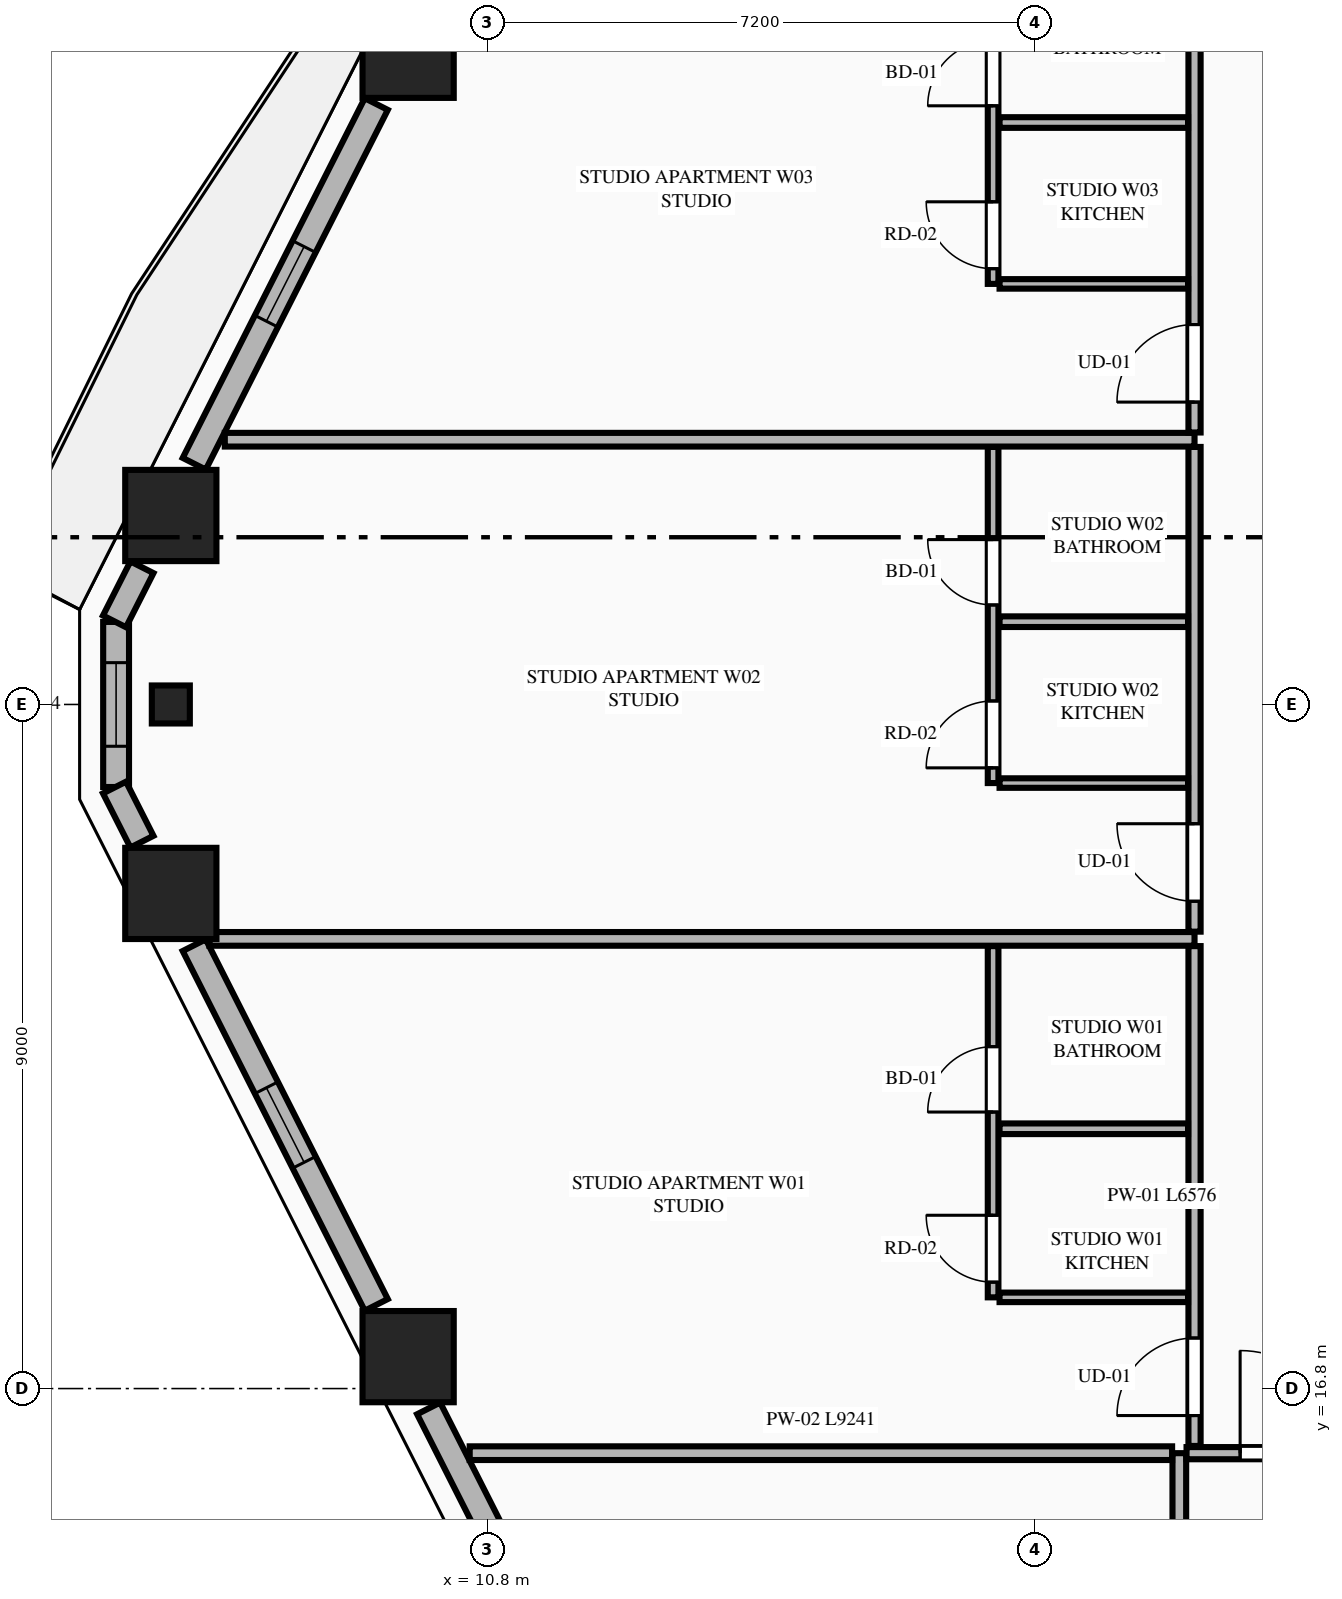
"""IFC4 building model, lengths in metres.
Left out: names, types, materials, properties, quantities, classifications, styles, units other than length and angle.
Written with IfcOpenShell. Run it as: python <this file> out.ifc"""

import sys

from ifc_helpers import new_model, si_unit, direction, frame, frame_2d, origin, origin_2d, place, context, subcontext, project, spatial, rectangle, extrude, element, fill, save


model = new_model("IFC4")
c1 = context("Model", 3, precision=1e-05, world=origin(), true_north=direction((0.0, 1.0)))
c2 = subcontext(c1, "Body", "Model", "MODEL_VIEW")
j1 = project(units=[si_unit("LENGTHUNIT", "METRE"), si_unit("PLANEANGLEUNIT", "RADIAN")], contexts=[c1])
p1 = place(None, origin())
s1 = spatial("IfcSite", under=j1, at=p1, CompositionType="ELEMENT")
p2 = place(p1, origin())
s2 = spatial("IfcBuilding", under=s1, at=p2, CompositionType="ELEMENT")
p3 = place(p2, frame((0.0, 0.0, 71.05)))
s3 = spatial("IfcBuildingStorey", under=s2, at=p3, CompositionType="ELEMENT", Elevation=71.05)
for number, where, z_axis, x_axis in (
    (1, (9.754, 34.38, 0.0), (0.0, 0.0, 1.0), (1.0, 0.0, 0.0)),
    (2, (6.632, 28.286, 0.0), (0.0, 0.0, 1.0), (1.0, 0.0, 0.0)),
    (3, (6.632, 23.314, 0.0), (0.0, 0.0, 1.0), (1.0, 0.0, 0.0)),
    (4, (9.754, 17.22, 0.0), (0.0, 0.0, 1.0), (1.0, 0.0, 0.0)),
):
    element("IfcColumn", number, at=place(p3, frame(where, z_axis=z_axis, x_axis=x_axis)), inside=s3, PredefinedType="COLUMN", context=c2, shape_type="SweptSolid", body=[
        extrude(rectangle(XDim=1.2, YDim=1.2, at=origin_2d()), origin(), (0.0, 0.0, 1.0), 3.55),
    ])
p4 = place(p3, frame((6.632, 25.8, 0.0), z_axis=(0.0, 0.0, 1.0), x_axis=(0.0, -1.0, 0.0)))
e5 = element("IfcColumn", 5, at=p4, inside=s3, PredefinedType="PILASTER", context=c2, shape_type="SweptSolid", body=[
    extrude(rectangle(XDim=0.5, YDim=0.35, at=origin_2d()), origin(), (0.0, 0.0, 1.0), 3.55),
])
p5 = place(p3, frame((5.912, 26.886, 0.0), z_axis=(0.0, 0.0, 1.0), x_axis=(0.0, -1.0, 0.0)))
e6 = element("IfcWall", 6, at=p5, inside=s3, PredefinedType="STANDARD", context=c2, shape_type="SweptSolid", body=[
    extrude(rectangle(XDim=2.172, YDim=0.34, at=frame_2d((1.086, 0.0))), origin(), (0.0, 0.0, 1.0), 3.27),
])
p6 = place(p5, frame((0.536, 0.0, 0.75)))
e7 = element("IfcOpeningElement", 7, at=p6, cuts=e6, PredefinedType="OPENING", context=c2, shape_type="SweptSolid", body=[
    extrude(rectangle(XDim=1.1, YDim=2.0, at=frame_2d((0.55, 1.0))), frame((0.0, 0.18, 0.0), z_axis=(0.0, -1.0, 0.0), x_axis=(1.0, 0.0, 0.0)), (0.0, 0.0, 1.0), 0.36),
])
p7 = place(p3, frame((9.335, 33.699, 0.0), z_axis=(0.0, 0.0, 1.0), x_axis=(-0.451590635984, -0.892225250422, 0.0)))
e8 = element("IfcWall", 8, at=p7, inside=s3, PredefinedType="STANDARD", context=c2, shape_type="SweptSolid", body=[
    extrude(rectangle(XDim=5.303, YDim=0.34, at=frame_2d((2.652, 0.0))), origin(), (0.0, 0.0, 1.0), 2.652),
])
p8 = place(p7, frame((2.102, 0.0, 0.75)))
e9 = element("IfcOpeningElement", 9, at=p8, cuts=e8, PredefinedType="OPENING", context=c2, shape_type="SweptSolid", body=[
    extrude(rectangle(XDim=1.1, YDim=1.752, at=frame_2d((0.55, 0.876))), frame((0.0, 0.18, 0.0), z_axis=(0.0, -1.0, 0.0), x_axis=(1.0, 0.0, 0.0)), (0.0, 0.0, 1.0), 0.36),
])
for number, where, z_axis, x_axis in (
    (10, (6.252, 27.605, 0.0), (0.0, 0.0, 1.0), (-0.452, -0.892, 0.0)),
    (11, (5.891, 24.707, 0.0), (0.0, 0.0, 1.0), (0.452, -0.892, 0.0)),
):
    element("IfcWall", number, at=place(p3, frame(where, z_axis=z_axis, x_axis=x_axis)), inside=s3, PredefinedType="STANDARD", context=c2, shape_type="SweptSolid", body=[
        extrude(rectangle(XDim=0.798, YDim=0.34, at=frame_2d((0.399, 0.0))), origin(), (0.0, 0.0, 1.0), 3.27),
    ])
p9 = place(p3, frame((6.94, 22.633, 0.0), z_axis=(0.0, 0.0, 1.0), x_axis=(0.451572088722, -0.892234637686, 0.0)))
e12 = element("IfcWall", 12, at=p9, inside=s3, PredefinedType="STANDARD", context=c2, shape_type="SweptSolid", body=[
    extrude(rectangle(XDim=5.304, YDim=0.34, at=frame_2d((2.652, 0.0))), origin(), (0.0, 0.0, 1.0), 2.652),
])
p10 = place(p9, frame((2.102, 0.0, 0.75)))
e13 = element("IfcOpeningElement", 13, at=p10, cuts=e12, PredefinedType="OPENING", context=c2, shape_type="SweptSolid", body=[
    extrude(rectangle(XDim=1.1, YDim=1.752, at=frame_2d((0.55, 0.876))), frame((0.0, 0.18, 0.0), z_axis=(0.0, -1.0, 0.0), x_axis=(1.0, 0.0, 0.0)), (0.0, 0.0, 1.0), 0.36),
])
p11 = place(p3, frame((10.024, 16.539, 0.0), z_axis=(0.0, 0.0, 1.0), x_axis=(0.451627137896, -0.892206774417, 0.0)))
e14 = element("IfcWall", 14, at=p11, inside=s3, PredefinedType="STANDARD", context=c2, shape_type="SweptSolid", body=[
    extrude(rectangle(XDim=5.547, YDim=0.34, at=frame_2d((2.773, 0.0))), origin(), (0.0, 0.0, 1.0), 2.652),
])
p12 = place(p11, frame((2.223, 0.0, 0.75)))
e15 = element("IfcOpeningElement", 15, at=p12, cuts=e14, PredefinedType="OPENING", context=c2, shape_type="SweptSolid", body=[
    extrude(rectangle(XDim=1.1, YDim=1.752, at=frame_2d((0.55, 0.876))), frame((0.0, 0.18, 0.0), z_axis=(0.0, -1.0, 0.0), x_axis=(1.0, 0.0, 0.0)), (0.0, 0.0, 1.0), 0.36),
])
p13 = place(p3, frame((19.9, 2.455, 0.0), z_axis=(0.0, 0.0, 1.0), x_axis=(0.0, 1.0, 0.0)))
e16 = element("IfcWall", 16, at=p13, inside=s3, PredefinedType="PARTITIONING", context=c2, shape_type="SweptSolid", body=[
    extrude(rectangle(XDim=13.495, YDim=0.18, at=frame_2d((6.748, 0.0))), origin(), (0.0, 0.0, 1.0), 3.27),
])
p14 = place(p3, frame((19.995, 15.95, 0.0), z_axis=(0.0, 0.0, 1.0), x_axis=(1.0, 0.0, 0.0)))
e17 = element("IfcWall", 17, at=p14, inside=s3, PredefinedType="PARTITIONING", context=c2, shape_type="SweptSolid", body=[
    extrude(rectangle(XDim=24.81, YDim=0.16, at=frame_2d((12.405, 0.0))), origin(), (0.0, 0.0, 1.0), 3.27),
])
p15 = place(p14, frame((0.705, 0.0, 0.0)))
e18 = element("IfcOpeningElement", 18, at=p15, cuts=e17, PredefinedType="OPENING", context=c2, shape_type="SweptSolid", body=[
    extrude(rectangle(XDim=1.35, YDim=2.35, at=frame_2d((0.675, 1.175))), frame((0.0, 0.09, 0.0), z_axis=(0.0, -1.0, 0.0), x_axis=(1.0, 0.0, 0.0)), (0.0, 0.0, 1.0), 0.18),
])
p16 = place(p3, frame((10.564, 15.95, 0.0), z_axis=(0.0, 0.0, 1.0), x_axis=(1.0, 0.0, 0.0)))
e19 = element("IfcWall", 19, at=p16, inside=s3, PredefinedType="PARTITIONING", context=c2, shape_type="SweptSolid", body=[
    extrude(rectangle(XDim=9.241, YDim=0.18, at=frame_2d((4.621, 0.0))), origin(), (0.0, 0.0, 1.0), 3.27),
])
p17 = place(p3, frame((20.1, 16.045, 0.0), z_axis=(0.0, 0.0, 1.0), x_axis=(0.0, 1.0, 0.0)))
e20 = element("IfcWall", 20, at=p17, inside=s3, PredefinedType="PARTITIONING", context=c2, shape_type="SweptSolid", body=[
    extrude(rectangle(XDim=6.576, YDim=0.16, at=frame_2d((3.288, 0.0))), origin(), (0.0, 0.0, 1.0), 2.64),
])
p18 = place(p17, frame((0.4, 0.0, 0.0)))
e21 = element("IfcOpeningElement", 21, at=p18, cuts=e20, PredefinedType="OPENING", context=c2, shape_type="SweptSolid", body=[
    extrude(rectangle(XDim=1.02, YDim=2.25, at=frame_2d((0.51, 1.125))), frame((0.0, 0.09, 0.0), z_axis=(0.0, -1.0, 0.0), x_axis=(1.0, 0.0, 0.0)), (0.0, 0.0, 1.0), 0.18),
])
p19 = place(p3, frame((17.535, 18.0, 0.0), z_axis=(0.0, 0.0, 1.0), x_axis=(1.0, 0.0, 0.0)))
e22 = element("IfcWall", 22, at=p19, inside=s3, PredefinedType="PARTITIONING", context=c2, shape_type="SweptSolid", body=[
    extrude(rectangle(XDim=2.48, YDim=0.125, at=frame_2d((1.24, 0.0))), origin(), (0.0, 0.0, 1.0), 2.64),
])
p20 = place(p3, frame((17.45, 18.0, 0.0), z_axis=(0.0, 0.0, 1.0), x_axis=(0.0, 1.0, 0.0)))
e23 = element("IfcWall", 23, at=p20, inside=s3, PredefinedType="PLUMBINGWALL", context=c2, shape_type="SweptSolid", body=[
    extrude(rectangle(XDim=4.621, YDim=0.14, at=frame_2d((2.311, 0.0))), origin(), (0.0, 0.0, 1.0), 3.27),
])
p21 = place(p20, frame((2.438, 0.0, 0.0)))
e24 = element("IfcOpeningElement", 24, at=p21, cuts=e23, PredefinedType="OPENING", context=c2, shape_type="SweptSolid", body=[
    extrude(rectangle(XDim=0.86, YDim=2.1, at=frame_2d((0.43, 1.05))), frame((0.0, 0.08, 0.0), z_axis=(0.0, -1.0, 0.0), x_axis=(1.0, 0.0, 0.0)), (0.0, 0.0, 1.0), 0.16),
])
p22 = place(p20, frame((0.2, 0.0, 0.0)))
e25 = element("IfcOpeningElement", 25, at=p22, cuts=e23, PredefinedType="OPENING", context=c2, shape_type="SweptSolid", body=[
    extrude(rectangle(XDim=0.88, YDim=2.15, at=frame_2d((0.44, 1.075))), frame((0.0, 0.08, 0.0), z_axis=(0.0, -1.0, 0.0), x_axis=(1.0, 0.0, 0.0)), (0.0, 0.0, 1.0), 0.16),
])
p23 = place(p3, frame((17.535, 20.218, 0.0), z_axis=(0.0, 0.0, 1.0), x_axis=(1.0, 0.0, 0.0)))
e26 = element("IfcWall", 26, at=p23, inside=s3, PredefinedType="PLUMBINGWALL", context=c2, shape_type="SweptSolid", body=[
    extrude(rectangle(XDim=2.48, YDim=0.14, at=frame_2d((1.24, 0.0))), origin(), (0.0, 0.0, 1.0), 3.27),
])
p24 = place(p3, frame((7.14, 22.716, 0.0), z_axis=(0.0, 0.0, 1.0), x_axis=(1.0, 0.0, 0.0)))
e27 = element("IfcWall", 27, at=p24, inside=s3, PredefinedType="PARTITIONING", context=c2, shape_type="SweptSolid", body=[
    extrude(rectangle(XDim=12.96, YDim=0.18, at=frame_2d((6.48, 0.0))), origin(), (0.0, 0.0, 1.0), 3.27),
])
p25 = place(p3, frame((20.1, 22.811, 0.0), z_axis=(0.0, 0.0, 1.0), x_axis=(0.0, 1.0, 0.0)))
e28 = element("IfcWall", 28, at=p25, inside=s3, PredefinedType="PARTITIONING", context=c2, shape_type="SweptSolid", body=[
    extrude(rectangle(XDim=6.377, YDim=0.16, at=frame_2d((3.188, 0.0))), origin(), (0.0, 0.0, 1.0), 3.27),
])
p26 = place(p25, frame((0.4, 0.0, 0.0)))
e29 = element("IfcOpeningElement", 29, at=p26, cuts=e28, PredefinedType="OPENING", context=c2, shape_type="SweptSolid", body=[
    extrude(rectangle(XDim=1.02, YDim=2.25, at=frame_2d((0.51, 1.125))), frame((0.0, 0.09, 0.0), z_axis=(0.0, -1.0, 0.0), x_axis=(1.0, 0.0, 0.0)), (0.0, 0.0, 1.0), 0.18),
])
p27 = place(p3, frame((17.535, 24.766, 0.0), z_axis=(0.0, 0.0, 1.0), x_axis=(1.0, 0.0, 0.0)))
e30 = element("IfcWall", 30, at=p27, inside=s3, PredefinedType="PARTITIONING", context=c2, shape_type="SweptSolid", body=[
    extrude(rectangle(XDim=2.48, YDim=0.125, at=frame_2d((1.24, 0.0))), origin(), (0.0, 0.0, 1.0), 3.27),
])
p28 = place(p3, frame((17.45, 24.766, 0.0), z_axis=(0.0, 0.0, 1.0), x_axis=(0.0, 1.0, 0.0)))
e31 = element("IfcWall", 31, at=p28, inside=s3, PredefinedType="PLUMBINGWALL", context=c2, shape_type="SweptSolid", body=[
    extrude(rectangle(XDim=4.422, YDim=0.14, at=frame_2d((2.211, 0.0))), origin(), (0.0, 0.0, 1.0), 3.27),
])
p29 = place(p28, frame((2.343, 0.0, 0.0)))
e32 = element("IfcOpeningElement", 32, at=p29, cuts=e31, PredefinedType="OPENING", context=c2, shape_type="SweptSolid", body=[
    extrude(rectangle(XDim=0.86, YDim=2.1, at=frame_2d((0.43, 1.05))), frame((0.0, 0.08, 0.0), z_axis=(0.0, -1.0, 0.0), x_axis=(1.0, 0.0, 0.0)), (0.0, 0.0, 1.0), 0.16),
])
p30 = place(p28, frame((0.2, 0.0, 0.0)))
e33 = element("IfcOpeningElement", 33, at=p30, cuts=e31, PredefinedType="OPENING", context=c2, shape_type="SweptSolid", body=[
    extrude(rectangle(XDim=0.88, YDim=2.15, at=frame_2d((0.44, 1.075))), frame((0.0, 0.08, 0.0), z_axis=(0.0, -1.0, 0.0), x_axis=(1.0, 0.0, 0.0)), (0.0, 0.0, 1.0), 0.16),
])
p31 = place(p3, frame((17.535, 26.889, 0.0), z_axis=(0.0, 0.0, 1.0), x_axis=(1.0, 0.0, 0.0)))
e34 = element("IfcWall", 34, at=p31, inside=s3, PredefinedType="PLUMBINGWALL", context=c2, shape_type="SweptSolid", body=[
    extrude(rectangle(XDim=2.48, YDim=0.14, at=frame_2d((1.24, 0.0))), origin(), (0.0, 0.0, 1.0), 3.27),
])
p32 = place(p3, frame((7.342, 29.283, 0.0), z_axis=(0.0, 0.0, 1.0), x_axis=(1.0, 0.0, 0.0)))
e35 = element("IfcWall", 35, at=p32, inside=s3, PredefinedType="PARTITIONING", context=c2, shape_type="SweptSolid", body=[
    extrude(rectangle(XDim=12.758, YDim=0.18, at=frame_2d((6.379, 0.0))), origin(), (0.0, 0.0, 1.0), 3.27),
])
p33 = place(p3, frame((20.1, 29.378, 0.0), z_axis=(0.0, 0.0, 1.0), x_axis=(0.0, 1.0, 0.0)))
e36 = element("IfcWall", 36, at=p33, inside=s3, PredefinedType="PARTITIONING", context=c2, shape_type="SweptSolid", body=[
    extrude(rectangle(XDim=6.377, YDim=0.16, at=frame_2d((3.188, 0.0))), origin(), (0.0, 0.0, 1.0), 2.64),
])
p34 = place(p33, frame((0.4, 0.0, 0.0)))
e37 = element("IfcOpeningElement", 37, at=p34, cuts=e36, PredefinedType="OPENING", context=c2, shape_type="SweptSolid", body=[
    extrude(rectangle(XDim=1.02, YDim=2.25, at=frame_2d((0.51, 1.125))), frame((0.0, 0.09, 0.0), z_axis=(0.0, -1.0, 0.0), x_axis=(1.0, 0.0, 0.0)), (0.0, 0.0, 1.0), 0.18),
])
p35 = place(p3, frame((17.535, 31.333, 0.0), z_axis=(0.0, 0.0, 1.0), x_axis=(1.0, 0.0, 0.0)))
e38 = element("IfcWall", 38, at=p35, inside=s3, PredefinedType="PARTITIONING", context=c2, shape_type="SweptSolid", body=[
    extrude(rectangle(XDim=2.48, YDim=0.125, at=frame_2d((1.24, 0.0))), origin(), (0.0, 0.0, 1.0), 3.27),
])
p36 = place(p3, frame((17.45, 31.333, 0.0), z_axis=(0.0, 0.0, 1.0), x_axis=(0.0, 1.0, 0.0)))
e39 = element("IfcWall", 39, at=p36, inside=s3, PredefinedType="PLUMBINGWALL", context=c2, shape_type="SweptSolid", body=[
    extrude(rectangle(XDim=4.422, YDim=0.14, at=frame_2d((2.211, 0.0))), origin(), (0.0, 0.0, 1.0), 3.27),
])
p37 = place(p36, frame((2.343, 0.0, 0.0)))
e40 = element("IfcOpeningElement", 40, at=p37, cuts=e39, PredefinedType="OPENING", context=c2, shape_type="SweptSolid", body=[
    extrude(rectangle(XDim=0.86, YDim=2.1, at=frame_2d((0.43, 1.05))), frame((0.0, 0.08, 0.0), z_axis=(0.0, -1.0, 0.0), x_axis=(1.0, 0.0, 0.0)), (0.0, 0.0, 1.0), 0.16),
])
p38 = place(p36, frame((0.2, 0.0, 0.0)))
e41 = element("IfcOpeningElement", 41, at=p38, cuts=e39, PredefinedType="OPENING", context=c2, shape_type="SweptSolid", body=[
    extrude(rectangle(XDim=0.88, YDim=2.15, at=frame_2d((0.44, 1.075))), frame((0.0, 0.08, 0.0), z_axis=(0.0, -1.0, 0.0), x_axis=(1.0, 0.0, 0.0)), (0.0, 0.0, 1.0), 0.16),
])
p39 = place(p3, frame((17.535, 33.456, 0.0), z_axis=(0.0, 0.0, 1.0), x_axis=(1.0, 0.0, 0.0)))
e42 = element("IfcWall", 42, at=p39, inside=s3, PredefinedType="PLUMBINGWALL", context=c2, shape_type="SweptSolid", body=[
    extrude(rectangle(XDim=2.48, YDim=0.14, at=frame_2d((1.24, 0.0))), origin(), (0.0, 0.0, 1.0), 2.64),
])
p40 = place(p8, origin())
e43 = element("IfcWindow", 43, at=p40, inside=s3, PartitioningType="SINGLE_PANEL", PredefinedType="WINDOW", context=c2, shape_type="SweptSolid", body=[
    extrude(rectangle(XDim=1.1, YDim=1.752, at=frame_2d((0.55, 0.876))), frame((0.0, 0.03, 0.0), z_axis=(0.0, -1.0, 0.0), x_axis=(1.0, 0.0, 0.0)), (0.0, 0.0, 1.0), 0.06),
])
fill(e9, e43)
p41 = place(p10, origin())
e44 = element("IfcWindow", 44, at=p41, inside=s3, PartitioningType="SINGLE_PANEL", PredefinedType="WINDOW", context=c2, shape_type="SweptSolid", body=[
    extrude(rectangle(XDim=1.1, YDim=1.752, at=frame_2d((0.55, 0.876))), frame((0.0, 0.03, 0.0), z_axis=(0.0, -1.0, 0.0), x_axis=(1.0, 0.0, 0.0)), (0.0, 0.0, 1.0), 0.06),
])
fill(e13, e44)
p42 = place(p15, origin())
e45 = element("IfcDoor", 45, at=p42, inside=s3, OperationType="SINGLE_SWING_LEFT", PredefinedType="DOOR", context=c2, shape_type="SweptSolid", body=[
    extrude(rectangle(XDim=1.35, YDim=2.35, at=frame_2d((0.675, 1.175))), frame((0.0, 0.025, 0.0), z_axis=(0.0, -1.0, 0.0), x_axis=(1.0, 0.0, 0.0)), (0.0, 0.0, 1.0), 0.05),
])
fill(e18, e45)
p43 = place(p21, origin())
e46 = element("IfcDoor", 46, at=p43, inside=s3, OperationType="SINGLE_SWING_LEFT", PredefinedType="DOOR", context=c2, shape_type="SweptSolid", body=[
    extrude(rectangle(XDim=0.86, YDim=2.1, at=frame_2d((0.43, 1.05))), frame((0.0, 0.025, 0.0), z_axis=(0.0, -1.0, 0.0), x_axis=(1.0, 0.0, 0.0)), (0.0, 0.0, 1.0), 0.05),
])
fill(e24, e46)
p44 = place(p18, origin())
e47 = element("IfcDoor", 47, at=p44, inside=s3, OperationType="SINGLE_SWING_LEFT", PredefinedType="DOOR", context=c2, shape_type="SweptSolid", body=[
    extrude(rectangle(XDim=1.02, YDim=2.25, at=frame_2d((0.51, 1.125))), frame((0.0, 0.025, 0.0), z_axis=(0.0, -1.0, 0.0), x_axis=(1.0, 0.0, 0.0)), (0.0, 0.0, 1.0), 0.05),
])
fill(e21, e47)
p45 = place(p22, origin())
e48 = element("IfcDoor", 48, at=p45, inside=s3, OperationType="SINGLE_SWING_RIGHT", PredefinedType="DOOR", context=c2, shape_type="SweptSolid", body=[
    extrude(rectangle(XDim=0.88, YDim=2.15, at=frame_2d((0.44, 1.075))), frame((0.0, 0.025, 0.0), z_axis=(0.0, -1.0, 0.0), x_axis=(1.0, 0.0, 0.0)), (0.0, 0.0, 1.0), 0.05),
])
fill(e25, e48)
p46 = place(p29, origin())
e49 = element("IfcDoor", 49, at=p46, inside=s3, OperationType="SINGLE_SWING_RIGHT", PredefinedType="DOOR", context=c2, shape_type="SweptSolid", body=[
    extrude(rectangle(XDim=0.86, YDim=2.1, at=frame_2d((0.43, 1.05))), frame((0.0, 0.025, 0.0), z_axis=(0.0, -1.0, 0.0), x_axis=(1.0, 0.0, 0.0)), (0.0, 0.0, 1.0), 0.05),
])
fill(e32, e49)
p47 = place(p26, origin())
e50 = element("IfcDoor", 50, at=p47, inside=s3, OperationType="SINGLE_SWING_RIGHT", PredefinedType="DOOR", context=c2, shape_type="SweptSolid", body=[
    extrude(rectangle(XDim=1.02, YDim=2.25, at=frame_2d((0.51, 1.125))), frame((0.0, 0.025, 0.0), z_axis=(0.0, -1.0, 0.0), x_axis=(1.0, 0.0, 0.0)), (0.0, 0.0, 1.0), 0.05),
])
fill(e29, e50)
p48 = place(p30, origin())
e51 = element("IfcDoor", 51, at=p48, inside=s3, OperationType="SINGLE_SWING_LEFT", PredefinedType="DOOR", context=c2, shape_type="SweptSolid", body=[
    extrude(rectangle(XDim=0.88, YDim=2.15, at=frame_2d((0.44, 1.075))), frame((0.0, 0.025, 0.0), z_axis=(0.0, -1.0, 0.0), x_axis=(1.0, 0.0, 0.0)), (0.0, 0.0, 1.0), 0.05),
])
fill(e33, e51)
p49 = place(p37, origin())
e52 = element("IfcDoor", 52, at=p49, inside=s3, OperationType="SINGLE_SWING_LEFT", PredefinedType="DOOR", context=c2, shape_type="SweptSolid", body=[
    extrude(rectangle(XDim=0.86, YDim=2.1, at=frame_2d((0.43, 1.05))), frame((0.0, 0.025, 0.0), z_axis=(0.0, -1.0, 0.0), x_axis=(1.0, 0.0, 0.0)), (0.0, 0.0, 1.0), 0.05),
])
fill(e40, e52)
p50 = place(p34, origin())
e53 = element("IfcDoor", 53, at=p50, inside=s3, OperationType="SINGLE_SWING_LEFT", PredefinedType="DOOR", context=c2, shape_type="SweptSolid", body=[
    extrude(rectangle(XDim=1.02, YDim=2.25, at=frame_2d((0.51, 1.125))), frame((0.0, 0.025, 0.0), z_axis=(0.0, -1.0, 0.0), x_axis=(1.0, 0.0, 0.0)), (0.0, 0.0, 1.0), 0.05),
])
fill(e37, e53)
p51 = place(p38, origin())
e54 = element("IfcDoor", 54, at=p51, inside=s3, OperationType="SINGLE_SWING_RIGHT", PredefinedType="DOOR", context=c2, shape_type="SweptSolid", body=[
    extrude(rectangle(XDim=0.88, YDim=2.15, at=frame_2d((0.44, 1.075))), frame((0.0, 0.025, 0.0), z_axis=(0.0, -1.0, 0.0), x_axis=(1.0, 0.0, 0.0)), (0.0, 0.0, 1.0), 0.05),
])
fill(e41, e54)
p52 = place(p6, origin())
e55 = element("IfcWindow", 55, at=p52, inside=s3, PartitioningType="SINGLE_PANEL", PredefinedType="WINDOW", context=c2, shape_type="SweptSolid", body=[
    extrude(rectangle(XDim=1.1, YDim=2.0, at=frame_2d((0.55, 1.0))), frame((0.0, 0.03, 0.0), z_axis=(0.0, -1.0, 0.0), x_axis=(1.0, 0.0, 0.0)), (0.0, 0.0, 1.0), 0.06),
])
fill(e7, e55)
save(model, sys.argv[1])
